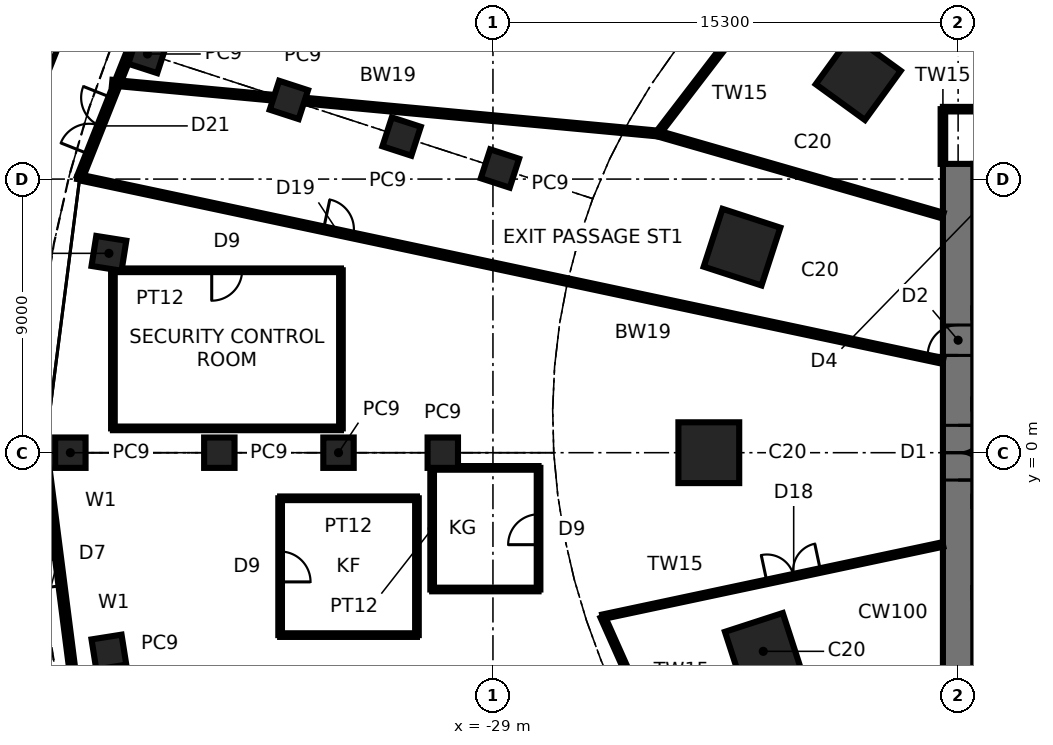
"""IFC4 building model, lengths in metres.
Left out: names, types, materials, properties, quantities, classifications, styles, units other than length and angle.
Written with IfcOpenShell. Run it as: python <this file> out.ifc"""

import sys

from ifc_helpers import new_model, si_unit, direction, frame, frame_2d, origin, origin_2d, place, context, subcontext, project, spatial, rectangle, extrude, element, fill, save


model = new_model("IFC4")
c1 = context("Model", 3, precision=1e-05, world=origin(), true_north=direction((0.0, 1.0)))
c2 = subcontext(c1, "Body", "Model", "MODEL_VIEW")
j1 = project(units=[si_unit("LENGTHUNIT", "METRE"), si_unit("PLANEANGLEUNIT", "RADIAN")], contexts=[c1])
p1 = place(None, origin())
s1 = spatial("IfcSite", under=j1, at=p1, CompositionType="ELEMENT")
p2 = place(p1, origin())
s2 = spatial("IfcBuilding", under=s1, at=p2, CompositionType="ELEMENT")
p3 = place(p2, origin())
s3 = spatial("IfcBuildingStorey", under=s2, at=p3, CompositionType="ELEMENT", Elevation=0.0)
for number, where, z_axis, x_axis in (
    (1, (-16.986, 12.341, 0.0), (0.0, 0.0, 1.0), (-0.809, 0.588, 0.0)),
    (2, (-20.808, 6.761, 0.0), (0.0, 0.0, 1.0), (-0.951, 0.309, 0.0)),
    (3, (-21.9, 0.0, 0.0), (0.0, 0.0, 1.0), (-1.0, 0.0, 0.0)),
    (4, (-20.109, -6.534, 0.0), (0.0, 0.0, 1.0), (-0.951, -0.309, 0.0)),
):
    element("IfcColumn", number, at=place(p3, frame(where, z_axis=z_axis, x_axis=x_axis)), inside=s3, PredefinedType="COLUMN", context=c2, shape_type="SweptSolid", body=[
        extrude(rectangle(XDim=2.0, YDim=2.0, at=origin_2d()), origin(), (0.0, 0.0, 1.0), 5.6),
    ])
for number, where, z_axis, x_axis in (
    (5, (-40.363, 13.115, 0.0), (0.0, 0.0, 1.0), (-0.951, 0.309, 0.0)),
    (6, (-41.632, 6.557, 0.0), (0.0, 0.0, 1.0), (-0.988, 0.156, 0.0)),
    (7, (-42.9, 0.0, 0.0), (0.0, 0.0, 1.0), (-1.0, 0.0, 0.0)),
    (8, (-41.632, -6.557, 0.0), (0.0, 0.0, 1.0), (-0.988, -0.156, 0.0)),
    (9, (-35.712, 11.604, 0.0), (0.0, 0.0, 1.0), (-0.951, 0.309, 0.0)),
    (10, (-38.0, 0.0, 0.0), (0.0, 0.0, 1.0), (-1.0, 0.0, 0.0)),
    (11, (-32.005, 10.399, 0.0), (0.0, 0.0, 1.0), (-0.951, 0.309, 0.0)),
    (12, (-34.08, 0.0, 0.0), (0.0, 0.0, 1.0), (-1.0, 0.0, 0.0)),
    (13, (-28.77, 9.348, 0.0), (0.0, 0.0, 1.0), (-0.951, 0.309, 0.0)),
    (14, (-30.65, 0.0, 0.0), (0.0, 0.0, 1.0), (-1.0, 0.0, 0.0)),
):
    element("IfcColumn", number, at=place(p3, frame(where, z_axis=z_axis, x_axis=x_axis)), inside=s3, PredefinedType="COLUMN", context=c2, shape_type="SweptSolid", body=[
        extrude(rectangle(XDim=1.0, YDim=1.0, at=origin_2d()), origin(), (0.0, 0.0, 1.0), 5.6),
    ])
p4 = place(p3, frame((-13.7, 9.5, 0.0), z_axis=(0.0, 0.0, 1.0), x_axis=(0.0, -1.0, 0.0)))
e15 = element("IfcWall", 15, at=p4, inside=s3, PredefinedType="SHEAR", context=c2, shape_type="SweptSolid", body=[
    extrude(rectangle(XDim=19.0, YDim=1.0, at=frame_2d((9.5, 0.0))), origin(), (0.0, 0.0, 1.0), 5.6),
])
p5 = place(p4, frame((8.6, 0.0, 0.0)))
e16 = element("IfcOpeningElement", 16, at=p5, cuts=e15, PredefinedType="OPENING", context=c2, shape_type="SweptSolid", body=[
    extrude(rectangle(XDim=1.8, YDim=2.4, at=frame_2d((0.9, 1.2))), frame((0.0, 0.51, 0.0), z_axis=(0.0, -1.0, 0.0), x_axis=(1.0, 0.0, 0.0)), (0.0, 0.0, 1.0), 1.02),
])
p6 = place(p4, frame((5.3, 0.0, 0.0)))
e17 = element("IfcOpeningElement", 17, at=p6, cuts=e15, PredefinedType="OPENING", context=c2, shape_type="SweptSolid", body=[
    extrude(rectangle(XDim=1.0, YDim=2.1, at=frame_2d((0.5, 1.05))), frame((0.0, 0.51, 0.0), z_axis=(0.0, -1.0, 0.0), x_axis=(1.0, 0.0, 0.0)), (0.0, 0.0, 1.0), 1.02),
])
p7 = place(p3, frame((-39.24, 17.471, 0.0), z_axis=(0.0, 0.0, 1.0), x_axis=(-0.369754749145, -0.929129391143, 0.0)))
e18 = element("IfcWall", 18, at=p7, inside=s3, PredefinedType="SOLIDWALL", context=c2, shape_type="SweptSolid", body=[
    extrude(rectangle(XDim=9.06, YDim=0.2, at=frame_2d((4.53, 0.0))), origin(), (0.0, 0.0, 1.0), 5.4),
])
p8 = place(p7, frame((6.235, 0.0, 0.0)))
e19 = element("IfcOpeningElement", 19, at=p8, cuts=e18, PredefinedType="OPENING", context=c2, shape_type="SweptSolid", body=[
    extrude(rectangle(XDim=2.0, YDim=2.7, at=frame_2d((1.0, 1.35))), frame((0.0, 0.11, 0.0), z_axis=(0.0, -1.0, 0.0), x_axis=(1.0, 0.0, 0.0)), (0.0, 0.0, 1.0), 0.22),
])
p9 = place(p3, frame((-43.75, 0.0, 0.0), z_axis=(0.0, 0.0, 1.0), x_axis=(0.127063093957, -0.991894636619, 0.0)))
e20 = element("IfcWall", 20, at=p9, inside=s3, PredefinedType="SOLIDWALL", context=c2, shape_type="SweptSolid", body=[
    extrude(rectangle(XDim=9.127, YDim=0.2, at=frame_2d((4.563, 0.0))), origin(), (0.0, 0.0, 1.0), 5.4),
])
p10 = place(p9, frame((2.609, 0.0, 0.0)))
e21 = element("IfcOpeningElement", 21, at=p10, cuts=e20, PredefinedType="OPENING", context=c2, shape_type="SweptSolid", body=[
    extrude(rectangle(XDim=1.8, YDim=2.7, at=frame_2d((0.9, 1.35))), frame((0.0, 0.11, 0.0), z_axis=(0.0, -1.0, 0.0), x_axis=(1.0, 0.0, 0.0)), (0.0, 0.0, 1.0), 0.22),
])
p11 = place(p9, frame((1.209, 0.0, 0.3)))
e22 = element("IfcOpeningElement", 22, at=p11, cuts=e20, PredefinedType="OPENING", context=c2, shape_type="SweptSolid", body=[
    extrude(rectangle(XDim=1.2, YDim=2.4, at=frame_2d((0.6, 1.2))), frame((0.0, 0.11, 0.0), z_axis=(0.0, -1.0, 0.0), x_axis=(1.0, 0.0, 0.0)), (0.0, 0.0, 1.0), 0.22),
])
p12 = place(p9, frame((4.609, 0.0, 0.3)))
e23 = element("IfcOpeningElement", 23, at=p12, cuts=e20, PredefinedType="OPENING", context=c2, shape_type="SweptSolid", body=[
    extrude(rectangle(XDim=1.2, YDim=2.4, at=frame_2d((0.6, 1.2))), frame((0.0, 0.11, 0.0), z_axis=(0.0, -1.0, 0.0), x_axis=(1.0, 0.0, 0.0)), (0.0, 0.0, 1.0), 0.22),
])
p13 = place(p9, frame((2.609, 0.0, 3.0)))
e24 = element("IfcOpeningElement", 24, at=p13, cuts=e20, PredefinedType="OPENING", context=c2, shape_type="SweptSolid", body=[
    extrude(rectangle(XDim=1.8, YDim=0.9, at=frame_2d((0.9, 0.45))), frame((0.0, 0.11, 0.0), z_axis=(0.0, -1.0, 0.0), x_axis=(1.0, 0.0, 0.0)), (0.0, 0.0, 1.0), 0.22),
])
p14 = place(p3, frame((-42.021, 16.905, -0.15), z_axis=(0.0, 0.0, 1.0), x_axis=(-0.369263988393, -0.929324543352, 0.0)))
e25 = element("IfcWall", 25, at=p14, inside=s3, PredefinedType="SOLIDWALL", context=c2, shape_type="SweptSolid", body=[
    extrude(rectangle(XDim=6.0, YDim=0.25, at=frame_2d((3.0, 0.0))), origin(), (0.0, 0.0, 1.0), 0.6),
])
p15 = place(p3, frame((-43.391, 17.45, -0.15), z_axis=(0.0, 0.0, 1.0), x_axis=(-0.369299129493, -0.929310579384, 0.0)))
e26 = element("IfcWall", 26, at=p15, inside=s3, PredefinedType="SOLIDWALL", context=c2, shape_type="SweptSolid", body=[
    extrude(rectangle(XDim=6.0, YDim=0.4, at=frame_2d((3.0, 0.0))), origin(), (0.0, 0.0, 1.0), 0.6),
])
p16 = place(p3, frame((-31.0, -0.5, 0.0), z_axis=(0.0, 0.0, 1.0), x_axis=(1.0, 0.0, 0.0)))
e27 = element("IfcWall", 27, at=p16, inside=s3, PredefinedType="PARTITIONING", context=c2, shape_type="SweptSolid", body=[
    extrude(rectangle(XDim=3.5, YDim=0.12, at=frame_2d((1.75, 0.0))), origin(), (0.0, 0.0, 1.0), 5.4),
])
p17 = place(p3, frame((-36.0, -1.5, 0.0), z_axis=(0.0, 0.0, 1.0), x_axis=(1.0, 0.0, 0.0)))
e28 = element("IfcWall", 28, at=p17, inside=s3, PredefinedType="PARTITIONING", context=c2, shape_type="SweptSolid", body=[
    extrude(rectangle(XDim=4.5, YDim=0.12, at=frame_2d((2.25, 0.0))), origin(), (0.0, 0.0, 1.0), 5.4),
])
p18 = place(p3, frame((-31.0, -4.5, 0.0), z_axis=(0.0, 0.0, 1.0), x_axis=(0.0, 1.0, 0.0)))
e29 = element("IfcWall", 29, at=p18, inside=s3, PredefinedType="PARTITIONING", context=c2, shape_type="SweptSolid", body=[
    extrude(rectangle(XDim=4.0, YDim=0.12, at=frame_2d((2.0, 0.0))), origin(), (0.0, 0.0, 1.0), 5.4),
])
p19 = place(p3, frame((-27.5, -0.5, 0.0), z_axis=(0.0, 0.0, 1.0), x_axis=(0.0, -1.0, 0.0)))
e30 = element("IfcWall", 30, at=p19, inside=s3, PredefinedType="PARTITIONING", context=c2, shape_type="SweptSolid", body=[
    extrude(rectangle(XDim=4.0, YDim=0.12, at=frame_2d((2.0, 0.0))), origin(), (0.0, 0.0, 1.0), 5.4),
])
p20 = place(p19, frame((1.526, 0.0, 0.0)))
e31 = element("IfcOpeningElement", 31, at=p20, cuts=e30, PredefinedType="OPENING", context=c2, shape_type="SweptSolid", body=[
    extrude(rectangle(XDim=1.0, YDim=2.4, at=frame_2d((0.5, 1.2))), frame((0.0, 0.07, 0.0), z_axis=(0.0, -1.0, 0.0), x_axis=(1.0, 0.0, 0.0)), (0.0, 0.0, 1.0), 0.14),
])
p21 = place(p3, frame((-36.0, -6.0, 0.0), z_axis=(0.0, 0.0, 1.0), x_axis=(0.0, 1.0, 0.0)))
e32 = element("IfcWall", 32, at=p21, inside=s3, PredefinedType="PARTITIONING", context=c2, shape_type="SweptSolid", body=[
    extrude(rectangle(XDim=4.5, YDim=0.12, at=frame_2d((2.25, 0.0))), origin(), (0.0, 0.0, 1.0), 5.4),
])
p22 = place(p21, frame((1.75, 0.0, 0.0)))
e33 = element("IfcOpeningElement", 33, at=p22, cuts=e32, PredefinedType="OPENING", context=c2, shape_type="SweptSolid", body=[
    extrude(rectangle(XDim=1.0, YDim=2.4, at=frame_2d((0.5, 1.2))), frame((0.0, 0.07, 0.0), z_axis=(0.0, -1.0, 0.0), x_axis=(1.0, 0.0, 0.0)), (0.0, 0.0, 1.0), 0.14),
])
p23 = place(p3, frame((-31.5, -1.5, 0.0), z_axis=(0.0, 0.0, 1.0), x_axis=(0.0, -1.0, 0.0)))
e34 = element("IfcWall", 34, at=p23, inside=s3, PredefinedType="PARTITIONING", context=c2, shape_type="SweptSolid", body=[
    extrude(rectangle(XDim=4.5, YDim=0.12, at=frame_2d((2.25, 0.0))), origin(), (0.0, 0.0, 1.0), 5.4),
])
p24 = place(p3, frame((-27.5, -4.5, 0.0), z_axis=(0.0, 0.0, 1.0), x_axis=(-1.0, 0.0, 0.0)))
e35 = element("IfcWall", 35, at=p24, inside=s3, PredefinedType="PARTITIONING", context=c2, shape_type="SweptSolid", body=[
    extrude(rectangle(XDim=3.5, YDim=0.12, at=frame_2d((1.75, 0.0))), origin(), (0.0, 0.0, 1.0), 5.4),
])
p25 = place(p3, frame((-31.5, -6.0, 0.0), z_axis=(0.0, 0.0, 1.0), x_axis=(-1.0, 0.0, 0.0)))
e36 = element("IfcWall", 36, at=p25, inside=s3, PredefinedType="PARTITIONING", context=c2, shape_type="SweptSolid", body=[
    extrude(rectangle(XDim=4.5, YDim=0.12, at=frame_2d((2.25, 0.0))), origin(), (0.0, 0.0, 1.0), 5.4),
])
p26 = place(p3, frame((-14.2, -3.018, 0.0), z_axis=(0.0, 0.0, 1.0), x_axis=(-0.978147950805, -0.207910043854, 0.0)))
e37 = element("IfcWall", 37, at=p26, inside=s3, PredefinedType="PARTITIONING", context=c2, shape_type="SweptSolid", body=[
    extrude(rectangle(XDim=11.443, YDim=0.15, at=frame_2d((5.722, 0.0))), origin(), (0.0, 0.0, 1.0), 5.4),
])
p27 = place(p26, frame((4.118, 0.0, 0.0)))
e38 = element("IfcOpeningElement", 38, at=p27, cuts=e37, PredefinedType="OPENING", context=c2, shape_type="SweptSolid", body=[
    extrude(rectangle(XDim=1.8, YDim=2.4, at=frame_2d((0.9, 1.2))), frame((0.0, 0.085, 0.0), z_axis=(0.0, -1.0, 0.0), x_axis=(1.0, 0.0, 0.0)), (0.0, 0.0, 1.0), 0.17),
])
p28 = place(p3, frame((-25.393, -5.397, 0.0), z_axis=(0.0, 0.0, 1.0), x_axis=(0.40763198254, -0.91314630088, 0.0)))
e39 = element("IfcWall", 39, at=p28, inside=s3, PredefinedType="PARTITIONING", context=c2, shape_type="SweptSolid", body=[
    extrude(rectangle(XDim=5.397, YDim=0.15, at=frame_2d((2.699, 0.0))), origin(), (0.0, 0.0, 1.0), 5.4),
])
p29 = place(p3, frame((-6.524, 11.3, 0.0), z_axis=(0.0, 0.0, 1.0), x_axis=(-0.499999476762, 0.866025705876, 0.0)))
e40 = element("IfcWall", 40, at=p29, inside=s3, PredefinedType="PARTITIONING", context=c2, shape_type="SweptSolid", body=[
    extrude(rectangle(XDim=26.751, YDim=0.15, at=frame_2d((13.376, 0.0))), origin(), (0.0, 0.0, 1.0), 5.4),
])
p30 = place(p3, frame((-1.992, 11.3, 0.0), z_axis=(0.0, 0.0, 1.0), x_axis=(-1.0, 0.0, 0.0)))
e41 = element("IfcWall", 41, at=p30, inside=s3, PredefinedType="PARTITIONING", context=c2, shape_type="SweptSolid", body=[
    extrude(rectangle(XDim=12.208, YDim=0.15, at=frame_2d((6.104, 0.0))), origin(), (0.0, 0.0, 1.0), 5.4),
])
p31 = place(p30, frame((5.782, 0.0, 0.0)))
e42 = element("IfcOpeningElement", 42, at=p31, cuts=e41, PredefinedType="OPENING", context=c2, shape_type="SweptSolid", body=[
    extrude(rectangle(XDim=1.2, YDim=2.4, at=frame_2d((0.6, 1.2))), frame((0.0, 0.085, 0.0), z_axis=(0.0, -1.0, 0.0), x_axis=(1.0, 0.0, 0.0)), (0.0, 0.0, 1.0), 0.17),
])
p32 = place(p30, frame((9.295, 0.0, 0.0)))
e43 = element("IfcOpeningElement", 43, at=p32, cuts=e41, PredefinedType="OPENING", context=c2, shape_type="SweptSolid", body=[
    extrude(rectangle(XDim=1.8, YDim=2.4, at=frame_2d((0.9, 1.2))), frame((0.0, 0.085, 0.0), z_axis=(0.0, -1.0, 0.0), x_axis=(1.0, 0.0, 0.0)), (0.0, 0.0, 1.0), 0.17),
])
p33 = place(p3, frame((-10.175, 11.3, 0.0), z_axis=(0.0, 0.0, 1.0), x_axis=(-0.669137674556, 0.743138461183, 0.0)))
e44 = element("IfcWall", 44, at=p33, inside=s3, PredefinedType="PARTITIONING", context=c2, shape_type="SweptSolid", body=[
    extrude(rectangle(XDim=9.046, YDim=0.15, at=frame_2d((4.523, 0.0))), origin(), (0.0, 0.0, 1.0), 5.4),
])
p34 = place(p3, frame((-14.2, 11.3, 0.0), z_axis=(0.0, 0.0, 1.0), x_axis=(0.0, -1.0, 0.0)))
e45 = element("IfcWall", 45, at=p34, inside=s3, PredefinedType="PARTITIONING", context=c2, shape_type="SweptSolid", body=[
    extrude(rectangle(XDim=1.8, YDim=0.15, at=frame_2d((0.9, 0.0))), origin(), (0.0, 0.0, 1.0), 5.4),
])
p35 = place(p3, frame((-20.315, 14.76, 0.0), z_axis=(0.0, 0.0, 1.0), x_axis=(-0.608593816375, -0.793481925862, 0.0)))
e46 = element("IfcWall", 46, at=p35, inside=s3, PredefinedType="PARTITIONING", context=c2, shape_type="SweptSolid", body=[
    extrude(rectangle(XDim=5.369, YDim=0.15, at=frame_2d((2.685, 0.0))), origin(), (0.0, 0.0, 1.0), 5.4),
])
p36 = place(p3, frame((-14.2, 7.8, 0.0), z_axis=(0.0, 0.0, 1.0), x_axis=(-0.961010848489, 0.27651066722, 0.0)))
e47 = element("IfcWall", 47, at=p36, inside=s3, PredefinedType="SOLIDWALL", context=c2, shape_type="SweptSolid", body=[
    extrude(rectangle(XDim=9.763, YDim=0.19, at=frame_2d((4.882, 0.0))), origin(), (0.0, 0.0, 1.0), 5.4),
])
p37 = place(p3, frame((-23.583, 10.5, 0.0), z_axis=(0.0, 0.0, 1.0), x_axis=(-0.995692930354, 0.092712396381, 0.0)))
e48 = element("IfcWall", 48, at=p37, inside=s3, PredefinedType="SOLIDWALL", context=c2, shape_type="SweptSolid", body=[
    extrude(rectangle(XDim=18.02, YDim=0.19, at=frame_2d((9.01, 0.0))), origin(), (0.0, 0.0, 1.0), 4.45),
])
p38 = place(p3, frame((-42.512, 9.036, 0.0), z_axis=(0.0, 0.0, 1.0), x_axis=(0.978148538657, -0.207907278186, 0.0)))
e49 = element("IfcWall", 49, at=p38, inside=s3, PredefinedType="SOLIDWALL", context=c2, shape_type="SweptSolid", body=[
    extrude(rectangle(XDim=28.945, YDim=0.19, at=frame_2d((14.472, 0.0))), origin(), (0.0, 0.0, 1.0), 5.4),
])
p39 = place(p38, frame((8.116, 0.0, 0.0)))
e50 = element("IfcOpeningElement", 50, at=p39, cuts=e49, PredefinedType="OPENING", context=c2, shape_type="SweptSolid", body=[
    extrude(rectangle(XDim=1.0, YDim=2.1, at=frame_2d((0.5, 1.05))), frame((0.0, 0.105, 0.0), z_axis=(0.0, -1.0, 0.0), x_axis=(1.0, 0.0, 0.0)), (0.0, 0.0, 1.0), 0.21),
])
p40 = place(p3, frame((-41.5, 6.0, 0.0), z_axis=(0.0, 0.0, 1.0), x_axis=(1.0, 0.0, 0.0)))
e51 = element("IfcWall", 51, at=p40, inside=s3, PredefinedType="PARTITIONING", context=c2, shape_type="SweptSolid", body=[
    extrude(rectangle(XDim=7.5, YDim=0.12, at=frame_2d((3.75, 0.0))), origin(), (0.0, 0.0, 1.0), 5.4),
])
p41 = place(p40, frame((3.25, 0.0, 0.0)))
e52 = element("IfcOpeningElement", 52, at=p41, cuts=e51, PredefinedType="OPENING", context=c2, shape_type="SweptSolid", body=[
    extrude(rectangle(XDim=1.0, YDim=2.4, at=frame_2d((0.5, 1.2))), frame((0.0, 0.07, 0.0), z_axis=(0.0, -1.0, 0.0), x_axis=(1.0, 0.0, 0.0)), (0.0, 0.0, 1.0), 0.14),
])
p42 = place(p3, frame((-34.0, 6.0, 0.0), z_axis=(0.0, 0.0, 1.0), x_axis=(0.0, -1.0, 0.0)))
e53 = element("IfcWall", 53, at=p42, inside=s3, PredefinedType="PARTITIONING", context=c2, shape_type="SweptSolid", body=[
    extrude(rectangle(XDim=5.2, YDim=0.12, at=frame_2d((2.6, 0.0))), origin(), (0.0, 0.0, 1.0), 4.2),
])
p43 = place(p3, frame((-41.5, 0.8, 0.0), z_axis=(0.0, 0.0, 1.0), x_axis=(0.0, 1.0, 0.0)))
e54 = element("IfcWall", 54, at=p43, inside=s3, PredefinedType="PARTITIONING", context=c2, shape_type="SweptSolid", body=[
    extrude(rectangle(XDim=5.2, YDim=0.12, at=frame_2d((2.6, 0.0))), origin(), (0.0, 0.0, 1.0), 4.15),
])
p44 = place(p3, frame((-34.0, 0.8, 0.0), z_axis=(0.0, 0.0, 1.0), x_axis=(-1.0, 0.0, 0.0)))
e55 = element("IfcWall", 55, at=p44, inside=s3, PredefinedType="PARTITIONING", context=c2, shape_type="SweptSolid", body=[
    extrude(rectangle(XDim=7.5, YDim=0.12, at=frame_2d((3.75, 0.0))), origin(), (0.0, 0.0, 1.0), 5.4),
])
p45 = place(p8, frame((2.0, 0.0, 0.0), z_axis=(0.0, 0.0, 1.0), x_axis=(-1.0, 0.0, 0.0)))
e56 = element("IfcDoor", 56, at=p45, inside=s3, OperationType="DOUBLE_DOOR_SINGLE_SWING", PredefinedType="DOOR", context=c2, shape_type="SweptSolid", body=[
    extrude(rectangle(XDim=2.0, YDim=2.7, at=frame_2d((1.0, 1.35))), frame((0.0, 0.025, 0.0), z_axis=(0.0, -1.0, 0.0), x_axis=(1.0, 0.0, 0.0)), (0.0, 0.0, 1.0), 0.05),
])
fill(e19, e56)
p46 = place(p10, frame((1.8, 0.0, 0.0), z_axis=(0.0, 0.0, 1.0), x_axis=(-1.0, 0.0, 0.0)))
e57 = element("IfcDoor", 57, at=p46, inside=s3, OperationType="DOUBLE_DOOR_SINGLE_SWING", PredefinedType="DOOR", context=c2, shape_type="SweptSolid", body=[
    extrude(rectangle(XDim=1.8, YDim=2.7, at=frame_2d((0.9, 1.35))), frame((0.0, 0.025, 0.0), z_axis=(0.0, -1.0, 0.0), x_axis=(1.0, 0.0, 0.0)), (0.0, 0.0, 1.0), 0.05),
])
fill(e21, e57)
p47 = place(p11, origin())
e58 = element("IfcWindow", 58, at=p47, inside=s3, PartitioningType="SINGLE_PANEL", PredefinedType="WINDOW", context=c2, shape_type="SweptSolid", body=[
    extrude(rectangle(XDim=1.2, YDim=2.4, at=frame_2d((0.6, 1.2))), frame((0.0, 0.03, 0.0), z_axis=(0.0, -1.0, 0.0), x_axis=(1.0, 0.0, 0.0)), (0.0, 0.0, 1.0), 0.06),
])
fill(e22, e58)
p48 = place(p12, origin())
e59 = element("IfcWindow", 59, at=p48, inside=s3, PartitioningType="SINGLE_PANEL", PredefinedType="WINDOW", context=c2, shape_type="SweptSolid", body=[
    extrude(rectangle(XDim=1.2, YDim=2.4, at=frame_2d((0.6, 1.2))), frame((0.0, 0.03, 0.0), z_axis=(0.0, -1.0, 0.0), x_axis=(1.0, 0.0, 0.0)), (0.0, 0.0, 1.0), 0.06),
])
fill(e23, e59)
p49 = place(p13, origin())
e60 = element("IfcWindow", 60, at=p49, inside=s3, PartitioningType="SINGLE_PANEL", PredefinedType="WINDOW", context=c2, shape_type="SweptSolid", body=[
    extrude(rectangle(XDim=1.8, YDim=0.9, at=frame_2d((0.9, 0.45))), frame((0.0, 0.03, 0.0), z_axis=(0.0, -1.0, 0.0), x_axis=(1.0, 0.0, 0.0)), (0.0, 0.0, 1.0), 0.06),
])
fill(e24, e60)
p50 = place(p5, origin())
e61 = element("IfcDoor", 61, at=p50, inside=s3, OperationType="DOUBLE_DOOR_SINGLE_SWING", PredefinedType="DOOR", context=c2, shape_type="SweptSolid", body=[
    extrude(rectangle(XDim=1.72, YDim=2.36, at=frame_2d((0.9, 1.18))), frame((0.0, 0.025, 0.0), z_axis=(0.0, -1.0, 0.0), x_axis=(1.0, 0.0, 0.0)), (0.0, 0.0, 1.0), 0.05),
    extrude(rectangle(XDim=0.04, YDim=2.4, at=frame_2d((0.02, 1.2))), frame((0.0, 0.25, 0.0), z_axis=(0.0, -1.0, 0.0), x_axis=(1.0, 0.0, 0.0)), (0.0, 0.0, 1.0), 0.5),
    extrude(rectangle(XDim=0.04, YDim=2.4, at=frame_2d((1.78, 1.2))), frame((0.0, 0.25, 0.0), z_axis=(0.0, -1.0, 0.0), x_axis=(1.0, 0.0, 0.0)), (0.0, 0.0, 1.0), 0.5),
    extrude(rectangle(XDim=1.72, YDim=0.04, at=frame_2d((0.9, 2.38))), frame((0.0, 0.25, 0.0), z_axis=(0.0, -1.0, 0.0), x_axis=(1.0, 0.0, 0.0)), (0.0, 0.0, 1.0), 0.5),
])
fill(e16, e61)
p51 = place(p6, frame((1.0, 0.0, 0.0), z_axis=(0.0, 0.0, 1.0), x_axis=(-1.0, 0.0, 0.0)))
e62 = element("IfcDoor", 62, at=p51, inside=s3, OperationType="SINGLE_SWING_LEFT", PredefinedType="DOOR", context=c2, shape_type="SweptSolid", body=[
    extrude(rectangle(XDim=0.92, YDim=2.06, at=frame_2d((0.5, 1.03))), frame((0.0, 0.025, 0.0), z_axis=(0.0, -1.0, 0.0), x_axis=(1.0, 0.0, 0.0)), (0.0, 0.0, 1.0), 0.05),
    extrude(rectangle(XDim=0.04, YDim=2.1, at=frame_2d((0.98, 1.05))), frame((0.0, 0.25, 0.0), z_axis=(0.0, -1.0, 0.0), x_axis=(1.0, 0.0, 0.0)), (0.0, 0.0, 1.0), 0.5),
    extrude(rectangle(XDim=0.04, YDim=2.1, at=frame_2d((0.02, 1.05))), frame((0.0, 0.25, 0.0), z_axis=(0.0, -1.0, 0.0), x_axis=(1.0, 0.0, 0.0)), (0.0, 0.0, 1.0), 0.5),
    extrude(rectangle(XDim=0.92, YDim=0.04, at=frame_2d((0.5, 2.08))), frame((0.0, 0.25, 0.0), z_axis=(0.0, -1.0, 0.0), x_axis=(1.0, 0.0, 0.0)), (0.0, 0.0, 1.0), 0.5),
])
fill(e17, e62)
p52 = place(p22, frame((1.0, 0.0, 0.0), z_axis=(0.0, 0.0, 1.0), x_axis=(-1.0, 0.0, 0.0)))
e63 = element("IfcDoor", 63, at=p52, inside=s3, OperationType="SINGLE_SWING_RIGHT", PredefinedType="DOOR", context=c2, shape_type="SweptSolid", body=[
    extrude(rectangle(XDim=1.0, YDim=2.4, at=frame_2d((0.5, 1.2))), frame((0.0, 0.025, 0.0), z_axis=(0.0, -1.0, 0.0), x_axis=(1.0, 0.0, 0.0)), (0.0, 0.0, 1.0), 0.05),
])
fill(e33, e63)
p53 = place(p20, frame((1.0, 0.0, 0.0), z_axis=(0.0, 0.0, 1.0), x_axis=(-1.0, 0.0, 0.0)))
e64 = element("IfcDoor", 64, at=p53, inside=s3, OperationType="SINGLE_SWING_LEFT", PredefinedType="DOOR", context=c2, shape_type="SweptSolid", body=[
    extrude(rectangle(XDim=1.0, YDim=2.4, at=frame_2d((0.5, 1.2))), frame((0.0, 0.025, 0.0), z_axis=(0.0, -1.0, 0.0), x_axis=(1.0, 0.0, 0.0)), (0.0, 0.0, 1.0), 0.05),
])
fill(e31, e64)
p54 = place(p41, frame((1.0, 0.0, 0.0), z_axis=(0.0, 0.0, 1.0), x_axis=(-1.0, 0.0, 0.0)))
e65 = element("IfcDoor", 65, at=p54, inside=s3, OperationType="SINGLE_SWING_RIGHT", PredefinedType="DOOR", context=c2, shape_type="SweptSolid", body=[
    extrude(rectangle(XDim=1.0, YDim=2.4, at=frame_2d((0.5, 1.2))), frame((0.0, 0.025, 0.0), z_axis=(0.0, -1.0, 0.0), x_axis=(1.0, 0.0, 0.0)), (0.0, 0.0, 1.0), 0.05),
])
fill(e52, e65)
p55 = place(p27, frame((1.8, 0.0, 0.0), z_axis=(0.0, 0.0, 1.0), x_axis=(-1.0, 0.0, 0.0)))
e66 = element("IfcDoor", 66, at=p55, inside=s3, OperationType="DOUBLE_DOOR_SINGLE_SWING", PredefinedType="DOOR", context=c2, shape_type="SweptSolid", body=[
    extrude(rectangle(XDim=1.8, YDim=2.4, at=frame_2d((0.9, 1.2))), frame((0.0, 0.025, 0.0), z_axis=(0.0, -1.0, 0.0), x_axis=(1.0, 0.0, 0.0)), (0.0, 0.0, 1.0), 0.05),
])
fill(e38, e66)
p56 = place(p39, origin())
e67 = element("IfcDoor", 67, at=p56, inside=s3, OperationType="SINGLE_SWING_LEFT", PredefinedType="DOOR", context=c2, shape_type="SweptSolid", body=[
    extrude(rectangle(XDim=1.0, YDim=2.1, at=frame_2d((0.5, 1.05))), frame((0.0, 0.025, 0.0), z_axis=(0.0, -1.0, 0.0), x_axis=(1.0, 0.0, 0.0)), (0.0, 0.0, 1.0), 0.05),
])
fill(e50, e67)
save(model, sys.argv[1])
